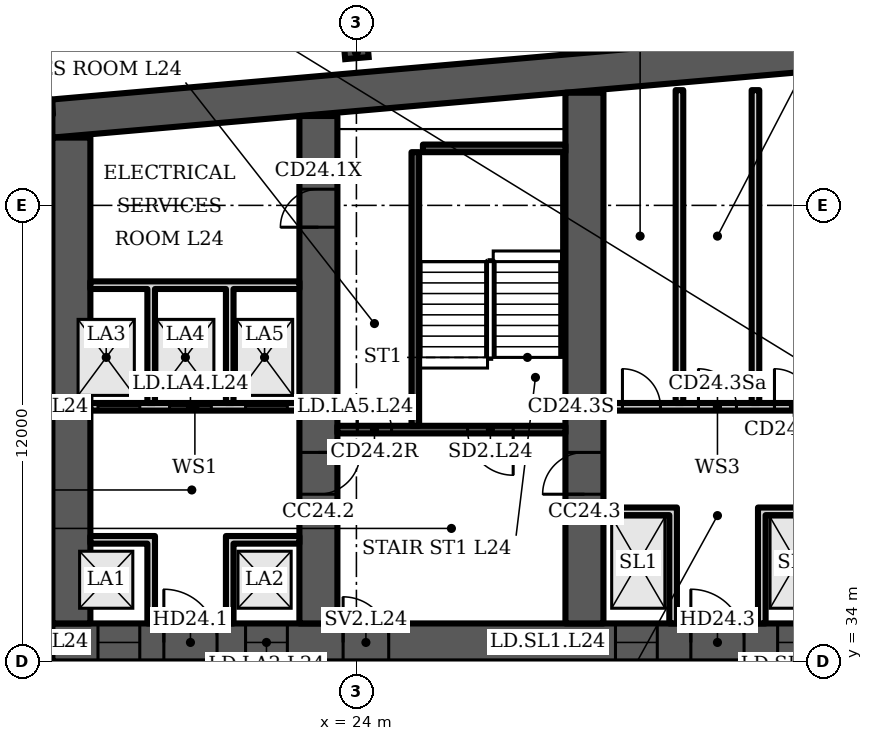
"""IFC4 building model, lengths in metres.
Left out: names, types, materials, properties, quantities, classifications, styles, units other than length and angle.
Written with IfcOpenShell. Run it as: python <this file> out.ifc"""

import sys

from ifc_helpers import new_model, si_unit, direction, frame, frame_2d, origin, origin_2d, place, context, subcontext, project, spatial, polyline, rectangle, i_section, outline, extrude, element, fill, save


model = new_model("IFC4")
c1 = context("Model", 3, precision=1e-05, world=origin(), true_north=direction((0.0, 1.0)))
c2 = subcontext(c1, "Body", "Model", "MODEL_VIEW")
j1 = project(units=[si_unit("LENGTHUNIT", "METRE"), si_unit("PLANEANGLEUNIT", "RADIAN")], contexts=[c1])
p1 = place(None, origin())
s1 = spatial("IfcSite", under=j1, at=p1, CompositionType="ELEMENT")
p2 = place(p1, origin())
s2 = spatial("IfcBuilding", under=s1, at=p2, CompositionType="ELEMENT")
p3 = place(p2, frame((0.0, 0.0, 107.5)))
s3 = spatial("IfcBuildingStorey", under=s2, at=p3, CompositionType="ELEMENT", Elevation=107.5)
p4 = place(p3, origin())
e1 = element("IfcWall", 1, at=p4, inside=s3, PredefinedType="SHEAR", context=c2, shape_type="SweptSolid", body=[
    extrude(outline(polyline([(16.0, 47.784), (40.5, 49.927), (65.0, 47.784), (65.0, 48.787), (40.5, 50.931), (16.0, 48.787), (16.0, 47.784)])), origin(), (0.0, 0.0, 1.0), 3.6),
])
p5 = place(p3, frame((16.0, 34.5, 0.0), z_axis=(0.0, 0.0, 1.0), x_axis=(1.0, 0.0, 0.0)))
e2 = element("IfcWall", 2, at=p5, inside=s3, PredefinedType="SHEAR", context=c2, shape_type="SweptSolid", body=[
    extrude(rectangle(XDim=49.0, YDim=1.0, at=frame_2d((24.5, 0.0))), origin(), (0.0, 0.0, 1.0), 3.6),
])
p6 = place(p5, frame((1.2, 0.0, 0.0)))
e3 = element("IfcOpeningElement", 3, at=p6, cuts=e2, PredefinedType="OPENING", context=c2, shape_type="SweptSolid", body=[
    extrude(rectangle(XDim=1.1, YDim=2.1, at=frame_2d((0.55, 1.05))), frame((0.0, 0.51, 0.0), z_axis=(0.0, -1.0, 0.0), x_axis=(1.0, 0.0, 0.0)), (0.0, 0.0, 1.0), 1.02),
])
p7 = place(p5, frame((5.083, 0.0, 0.0)))
e4 = element("IfcOpeningElement", 4, at=p7, cuts=e2, PredefinedType="OPENING", context=c2, shape_type="SweptSolid", body=[
    extrude(rectangle(XDim=1.1, YDim=2.1, at=frame_2d((0.55, 1.05))), frame((0.0, 0.51, 0.0), z_axis=(0.0, -1.0, 0.0), x_axis=(1.0, 0.0, 0.0)), (0.0, 0.0, 1.0), 1.02),
])
p8 = place(p5, frame((2.933, 0.0, 0.0)))
e5 = element("IfcOpeningElement", 5, at=p8, cuts=e2, PredefinedType="OPENING", context=c2, shape_type="SweptSolid", body=[
    extrude(rectangle(XDim=1.4, YDim=2.1, at=frame_2d((0.7, 1.05))), frame((0.0, 0.51, 0.0), z_axis=(0.0, -1.0, 0.0), x_axis=(1.0, 0.0, 0.0)), (0.0, 0.0, 1.0), 1.02),
])
p9 = place(p5, frame((7.65, 0.0, 0.0)))
e6 = element("IfcOpeningElement", 6, at=p9, cuts=e2, PredefinedType="OPENING", context=c2, shape_type="SweptSolid", body=[
    extrude(rectangle(XDim=1.2, YDim=2.1, at=frame_2d((0.6, 1.05))), frame((0.0, 0.51, 0.0), z_axis=(0.0, -1.0, 0.0), x_axis=(1.0, 0.0, 0.0)), (0.0, 0.0, 1.0), 1.02),
])
p10 = place(p5, frame((14.817, 0.0, 0.0)))
e7 = element("IfcOpeningElement", 7, at=p10, cuts=e2, PredefinedType="OPENING", context=c2, shape_type="SweptSolid", body=[
    extrude(rectangle(XDim=1.1, YDim=2.1, at=frame_2d((0.55, 1.05))), frame((0.0, 0.51, 0.0), z_axis=(0.0, -1.0, 0.0), x_axis=(1.0, 0.0, 0.0)), (0.0, 0.0, 1.0), 1.02),
])
p11 = place(p5, frame((19.083, 0.0, 0.0)))
e8 = element("IfcOpeningElement", 8, at=p11, cuts=e2, PredefinedType="OPENING", context=c2, shape_type="SweptSolid", body=[
    extrude(rectangle(XDim=1.1, YDim=2.1, at=frame_2d((0.55, 1.05))), frame((0.0, 0.51, 0.0), z_axis=(0.0, -1.0, 0.0), x_axis=(1.0, 0.0, 0.0)), (0.0, 0.0, 1.0), 1.02),
])
p12 = place(p5, frame((16.8, 0.0, 0.0)))
e9 = element("IfcOpeningElement", 9, at=p12, cuts=e2, PredefinedType="OPENING", context=c2, shape_type="SweptSolid", body=[
    extrude(rectangle(XDim=1.4, YDim=2.1, at=frame_2d((0.7, 1.05))), frame((0.0, 0.51, 0.0), z_axis=(0.0, -1.0, 0.0), x_axis=(1.0, 0.0, 0.0)), (0.0, 0.0, 1.0), 1.02),
])
p13 = place(p5, frame((21.817, 0.0, 0.0)))
e10 = element("IfcOpeningElement", 10, at=p13, cuts=e2, PredefinedType="OPENING", context=c2, shape_type="SweptSolid", body=[
    extrude(rectangle(XDim=1.1, YDim=2.1, at=frame_2d((0.55, 1.05))), frame((0.0, 0.51, 0.0), z_axis=(0.0, -1.0, 0.0), x_axis=(1.0, 0.0, 0.0)), (0.0, 0.0, 1.0), 1.02),
])
p14 = place(p5, frame((26.083, 0.0, 0.0)))
e11 = element("IfcOpeningElement", 11, at=p14, cuts=e2, PredefinedType="OPENING", context=c2, shape_type="SweptSolid", body=[
    extrude(rectangle(XDim=1.1, YDim=2.1, at=frame_2d((0.55, 1.05))), frame((0.0, 0.51, 0.0), z_axis=(0.0, -1.0, 0.0), x_axis=(1.0, 0.0, 0.0)), (0.0, 0.0, 1.0), 1.02),
])
p15 = place(p5, frame((33.15, 0.0, 0.0)))
e12 = element("IfcOpeningElement", 12, at=p15, cuts=e2, PredefinedType="OPENING", context=c2, shape_type="SweptSolid", body=[
    extrude(rectangle(XDim=1.2, YDim=2.1, at=frame_2d((0.6, 1.05))), frame((0.0, 0.51, 0.0), z_axis=(0.0, -1.0, 0.0), x_axis=(1.0, 0.0, 0.0)), (0.0, 0.0, 1.0), 1.02),
])
p16 = place(p5, frame((37.8, 0.0, 0.0)))
e13 = element("IfcOpeningElement", 13, at=p16, cuts=e2, PredefinedType="OPENING", context=c2, shape_type="SweptSolid", body=[
    extrude(rectangle(XDim=1.4, YDim=2.1, at=frame_2d((0.7, 1.05))), frame((0.0, 0.51, 0.0), z_axis=(0.0, -1.0, 0.0), x_axis=(1.0, 0.0, 0.0)), (0.0, 0.0, 1.0), 1.02),
])
p17 = place(p5, frame((42.817, 0.0, 0.0)))
e14 = element("IfcOpeningElement", 14, at=p17, cuts=e2, PredefinedType="OPENING", context=c2, shape_type="SweptSolid", body=[
    extrude(rectangle(XDim=1.1, YDim=2.1, at=frame_2d((0.55, 1.05))), frame((0.0, 0.51, 0.0), z_axis=(0.0, -1.0, 0.0), x_axis=(1.0, 0.0, 0.0)), (0.0, 0.0, 1.0), 1.02),
])
p18 = place(p5, frame((46.7, 0.0, 0.0)))
e15 = element("IfcOpeningElement", 15, at=p18, cuts=e2, PredefinedType="OPENING", context=c2, shape_type="SweptSolid", body=[
    extrude(rectangle(XDim=1.1, YDim=2.1, at=frame_2d((0.55, 1.05))), frame((0.0, 0.51, 0.0), z_axis=(0.0, -1.0, 0.0), x_axis=(1.0, 0.0, 0.0)), (0.0, 0.0, 1.0), 1.02),
])
p19 = place(p5, frame((44.667, 0.0, 0.0)))
e16 = element("IfcOpeningElement", 16, at=p19, cuts=e2, PredefinedType="OPENING", context=c2, shape_type="SweptSolid", body=[
    extrude(rectangle(XDim=1.4, YDim=2.1, at=frame_2d((0.7, 1.05))), frame((0.0, 0.51, 0.0), z_axis=(0.0, -1.0, 0.0), x_axis=(1.0, 0.0, 0.0)), (0.0, 0.0, 1.0), 1.02),
])
p20 = place(p3, frame((16.5, 35.0, 0.0), z_axis=(0.0, 0.0, 1.0), x_axis=(0.0, 1.0, 0.0)))
e17 = element("IfcWall", 17, at=p20, inside=s3, PredefinedType="SHEAR", context=c2, shape_type="SweptSolid", body=[
    extrude(rectangle(XDim=12.784, YDim=1.0, at=frame_2d((6.392, 0.0))), origin(), (0.0, 0.0, 1.0), 3.6),
])
p21 = place(p3, frame((23.0, 35.0, 0.0), z_axis=(0.0, 0.0, 1.0), x_axis=(0.0, 1.0, 0.0)))
e18 = element("IfcWall", 18, at=p21, inside=s3, PredefinedType="SHEAR", context=c2, shape_type="SweptSolid", body=[
    extrude(rectangle(XDim=13.352, YDim=1.0, at=frame_2d((6.676, 0.0))), origin(), (0.0, 0.0, 1.0), 3.6),
])
p22 = place(p21, frame((10.426, 0.0, 0.0)))
e19 = element("IfcOpeningElement", 19, at=p22, cuts=e18, PredefinedType="OPENING", context=c2, shape_type="SweptSolid", body=[
    extrude(rectangle(XDim=1.0, YDim=2.1, at=frame_2d((0.5, 1.05))), frame((0.0, 0.51, 0.0), z_axis=(0.0, -1.0, 0.0), x_axis=(1.0, 0.0, 0.0)), (0.0, 0.0, 1.0), 1.02),
])
p23 = place(p21, frame((3.4, 0.0, 0.0)))
e20 = element("IfcOpeningElement", 20, at=p23, cuts=e18, PredefinedType="OPENING", context=c2, shape_type="SweptSolid", body=[
    extrude(rectangle(XDim=1.1, YDim=2.1, at=frame_2d((0.55, 1.05))), frame((0.0, 0.51, 0.0), z_axis=(0.0, -1.0, 0.0), x_axis=(1.0, 0.0, 0.0)), (0.0, 0.0, 1.0), 1.02),
])
p24 = place(p3, frame((30.0, 35.0, 0.0), z_axis=(0.0, 0.0, 1.0), x_axis=(0.0, 1.0, 0.0)))
e21 = element("IfcWall", 21, at=p24, inside=s3, PredefinedType="SHEAR", context=c2, shape_type="SweptSolid", body=[
    extrude(rectangle(XDim=13.965, YDim=1.0, at=frame_2d((6.982, 0.0))), origin(), (0.0, 0.0, 1.0), 3.6),
])
p25 = place(p24, frame((3.4, 0.0, 0.0)))
e22 = element("IfcOpeningElement", 22, at=p25, cuts=e21, PredefinedType="OPENING", context=c2, shape_type="SweptSolid", body=[
    extrude(rectangle(XDim=1.1, YDim=2.1, at=frame_2d((0.55, 1.05))), frame((0.0, 0.51, 0.0), z_axis=(0.0, -1.0, 0.0), x_axis=(1.0, 0.0, 0.0)), (0.0, 0.0, 1.0), 1.02),
])
p26 = place(p3, frame((24.0, 50.027, 0.0), z_axis=(0.0, 0.0, 1.0), x_axis=(-0.087156, 0.996198, 0.0)))
e23 = element("IfcColumn", 23, at=p26, inside=s3, PredefinedType="COLUMN", context=c2, shape_type="SweptSolid", body=[
    extrude(i_section(OverallWidth=0.305, OverallDepth=0.62, WebThickness=0.021, FlangeThickness=0.04, FilletRadius=0.027, at=origin_2d()), origin(), (0.0, 0.0, 1.0), 3.6),
])
p27 = place(p3, frame((16.0, 48.587, 0.0), z_axis=(0.0, 0.0, 1.0), x_axis=(-0.996194, -0.087168, 0.0)))
e24 = element("IfcWall", 24, at=p27, inside=s3, PredefinedType="SOLIDWALL", context=c2, shape_type="SweptSolid", body=[
    extrude(rectangle(XDim=2.994, YDim=0.4, at=frame_2d((1.497, 0.0))), origin(), (0.0, 0.0, 1.0), 3.2),
])
p28 = place(p3, frame((17.0, 40.7, 0.0), z_axis=(0.0, 0.0, 1.0), x_axis=(1.0, 0.0, 0.0)))
e25 = element("IfcWall", 25, at=p28, inside=s3, PredefinedType="PARTITIONING", context=c2, shape_type="SweptSolid", body=[
    extrude(rectangle(XDim=5.5, YDim=0.2, at=frame_2d((2.75, 0.0))), origin(), (0.0, 0.0, 1.0), 3.2),
])
p29 = place(p28, frame((0.2, 0.0, 0.0)))
e26 = element("IfcOpeningElement", 26, at=p29, cuts=e25, PredefinedType="OPENING", context=c2, shape_type="SweptSolid", body=[
    extrude(rectangle(XDim=1.1, YDim=2.1, at=frame_2d((0.55, 1.05))), frame((0.0, 0.11, 0.0), z_axis=(0.0, -1.0, 0.0), x_axis=(1.0, 0.0, 0.0)), (0.0, 0.0, 1.0), 0.22),
])
p30 = place(p28, frame((2.083, 0.0, 0.0)))
e27 = element("IfcOpeningElement", 27, at=p30, cuts=e25, PredefinedType="OPENING", context=c2, shape_type="SweptSolid", body=[
    extrude(rectangle(XDim=1.1, YDim=2.1, at=frame_2d((0.55, 1.05))), frame((0.0, 0.11, 0.0), z_axis=(0.0, -1.0, 0.0), x_axis=(1.0, 0.0, 0.0)), (0.0, 0.0, 1.0), 0.22),
])
p31 = place(p28, frame((4.083, 0.0, 0.0)))
e28 = element("IfcOpeningElement", 28, at=p31, cuts=e25, PredefinedType="OPENING", context=c2, shape_type="SweptSolid", body=[
    extrude(rectangle(XDim=1.1, YDim=2.1, at=frame_2d((0.55, 1.05))), frame((0.0, 0.11, 0.0), z_axis=(0.0, -1.0, 0.0), x_axis=(1.0, 0.0, 0.0)), (0.0, 0.0, 1.0), 0.22),
])
p32 = place(p3, frame((0.0, 0.0, -0.0)))
e29 = element("IfcWall", 29, at=p32, inside=s3, PredefinedType="PARTITIONING", context=c2, shape_type="SweptSolid", body=[
    extrude(outline(polyline([(18.5, 37.1), (17.0, 37.1), (17.0, 37.3), (18.5, 37.3), (18.7, 37.3), (18.7, 35.0), (18.5, 35.0), (18.5, 37.1)])), origin(), (0.0, 0.0, 1.0), 3.2),
])
p33 = place(p3, frame((0.0, 0.0, -0.0)))
e30 = element("IfcWall", 30, at=p33, inside=s3, PredefinedType="PARTITIONING", context=c2, shape_type="SweptSolid", body=[
    extrude(outline(polyline([(20.567, 37.3), (20.767, 37.3), (22.5, 37.3), (22.5, 37.1), (20.767, 37.1), (20.767, 35.0), (20.567, 35.0), (20.567, 37.3)])), origin(), (0.0, 0.0, 1.0), 3.2),
])
p34 = place(p3, frame((0.0, 0.0, -0.0)))
e31 = element("IfcWall", 31, at=p34, inside=s3, PredefinedType="PARTITIONING", context=c2, shape_type="SweptSolid", body=[
    extrude(outline(polyline([(18.7, 40.8), (18.5, 40.8), (18.5, 43.8), (17.0, 43.8), (17.0, 44.0), (22.5, 44.0), (22.5, 43.8), (20.767, 43.8), (20.767, 40.8), (20.567, 40.8), (20.567, 43.8), (18.7, 43.8), (18.7, 40.8)])), origin(), (0.0, 0.0, 1.0), 3.2),
])
p35 = place(p3, frame((23.5, 40.1, 0.0), z_axis=(0.0, 0.0, 1.0), x_axis=(1.0, 0.0, 0.0)))
e32 = element("IfcWall", 32, at=p35, inside=s3, PredefinedType="SHEAR", context=c2, shape_type="SweptSolid", body=[
    extrude(rectangle(XDim=6.0, YDim=0.2, at=frame_2d((3.0, 0.0))), origin(), (0.0, 0.0, 1.0), 3.2),
])
p36 = place(p35, frame((3.425, 0.0, 0.0)))
e33 = element("IfcOpeningElement", 33, at=p36, cuts=e32, PredefinedType="OPENING", context=c2, shape_type="SweptSolid", body=[
    extrude(rectangle(XDim=1.2, YDim=2.1, at=frame_2d((0.6, 1.05))), frame((0.0, 0.11, 0.0), z_axis=(0.0, -1.0, 0.0), x_axis=(1.0, 0.0, 0.0)), (0.0, 0.0, 1.0), 0.22),
])
p37 = place(p35, frame((0.525, 0.0, 0.0)))
e34 = element("IfcOpeningElement", 34, at=p37, cuts=e32, PredefinedType="OPENING", context=c2, shape_type="SweptSolid", body=[
    extrude(rectangle(XDim=0.9, YDim=2.1, at=frame_2d((0.45, 1.05))), frame((0.0, 0.11, 0.0), z_axis=(0.0, -1.0, 0.0), x_axis=(1.0, 0.0, 0.0)), (0.0, 0.0, 1.0), 0.22),
])
p38 = place(p3, frame((25.55, 40.2, 0.0), z_axis=(0.0, 0.0, 1.0), x_axis=(0.0, 1.0, 0.0)))
e35 = element("IfcWall", 35, at=p38, inside=s3, PredefinedType="SHEAR", context=c2, shape_type="SweptSolid", body=[
    extrude(rectangle(XDim=7.2, YDim=0.2, at=frame_2d((3.6, 0.0))), origin(), (0.0, 0.0, 1.0), 3.2),
])
p39 = place(p3, frame((25.75, 47.5, 0.0), z_axis=(0.0, 0.0, 1.0), x_axis=(1.0, 0.0, 0.0)))
e36 = element("IfcWall", 36, at=p39, inside=s3, PredefinedType="SHEAR", context=c2, shape_type="SweptSolid", body=[
    extrude(rectangle(XDim=3.75, YDim=0.2, at=frame_2d((1.875, 0.0))), origin(), (0.0, 0.0, 1.0), 3.2),
])
p40 = place(p3, frame((30.5, 40.7, 0.0), z_axis=(0.0, 0.0, 1.0), x_axis=(1.0, 0.0, 0.0)))
e37 = element("IfcWall", 37, at=p40, inside=s3, PredefinedType="PARTITIONING", context=c2, shape_type="SweptSolid", body=[
    extrude(rectangle(XDim=6.0, YDim=0.2, at=frame_2d((3.0, 0.0))), origin(), (0.0, 0.0, 1.0), 3.2),
])
p41 = place(p40, frame((0.5, 0.0, 0.0)))
e38 = element("IfcOpeningElement", 38, at=p41, cuts=e37, PredefinedType="OPENING", context=c2, shape_type="SweptSolid", body=[
    extrude(rectangle(XDim=1.0, YDim=2.1, at=frame_2d((0.5, 1.05))), frame((0.0, 0.11, 0.0), z_axis=(0.0, -1.0, 0.0), x_axis=(1.0, 0.0, 0.0)), (0.0, 0.0, 1.0), 0.22),
])
p42 = place(p40, frame((2.5, 0.0, 0.0)))
e39 = element("IfcOpeningElement", 39, at=p42, cuts=e37, PredefinedType="OPENING", context=c2, shape_type="SweptSolid", body=[
    extrude(rectangle(XDim=1.0, YDim=2.1, at=frame_2d((0.5, 1.05))), frame((0.0, 0.11, 0.0), z_axis=(0.0, -1.0, 0.0), x_axis=(1.0, 0.0, 0.0)), (0.0, 0.0, 1.0), 0.22),
])
p43 = place(p40, frame((4.5, 0.0, 0.0)))
e40 = element("IfcOpeningElement", 40, at=p43, cuts=e37, PredefinedType="OPENING", context=c2, shape_type="SweptSolid", body=[
    extrude(rectangle(XDim=1.0, YDim=2.1, at=frame_2d((0.5, 1.05))), frame((0.0, 0.11, 0.0), z_axis=(0.0, -1.0, 0.0), x_axis=(1.0, 0.0, 0.0)), (0.0, 0.0, 1.0), 0.22),
])
p44 = place(p3, frame((0.0, 0.0, -0.0)))
e41 = element("IfcWall", 41, at=p44, inside=s3, PredefinedType="PARTITIONING", context=c2, shape_type="SweptSolid", body=[
    extrude(outline(polyline([(32.233, 37.85), (30.5, 37.85), (30.5, 38.05), (32.233, 38.05), (32.433, 38.05), (32.433, 35.0), (32.233, 35.0), (32.233, 37.85)])), origin(), (0.0, 0.0, 1.0), 3.2),
])
p45 = place(p3, frame((0.0, 0.0, -0.0)))
e42 = element("IfcWall", 42, at=p45, inside=s3, PredefinedType="PARTITIONING", context=c2, shape_type="SweptSolid", body=[
    extrude(outline(polyline([(34.567, 38.05), (34.767, 38.05), (36.5, 38.05), (36.5, 37.85), (34.767, 37.85), (34.767, 35.0), (34.567, 35.0), (34.567, 38.05)])), origin(), (0.0, 0.0, 1.0), 3.2),
])
for number, where, z_axis, x_axis in (
    (43, (32.5, 40.8, 0.0), (0.0, 0.0, 1.0), (0.0, 1.0, 0.0)),
    (44, (34.5, 40.8, 0.0), (0.0, 0.0, 1.0), (0.0, 1.0, 0.0)),
):
    element("IfcWall", number, at=place(p3, frame(where, z_axis=z_axis, x_axis=x_axis)), inside=s3, PredefinedType="PARTITIONING", context=c2, shape_type="SweptSolid", body=[
        extrude(rectangle(XDim=8.232, YDim=0.2, at=frame_2d((4.116, 0.0))), origin(), (0.0, 0.0, 1.0), 3.2),
    ])
p46 = place(p6, origin())
e45 = element("IfcDoor", 45, at=p46, inside=s3, OperationType="DOUBLE_DOOR_SLIDING", PredefinedType="DOOR", context=c2, shape_type="SweptSolid", body=[
    extrude(rectangle(XDim=1.1, YDim=2.1, at=frame_2d((0.55, 1.05))), frame((0.0, 0.025, 0.0), z_axis=(0.0, -1.0, 0.0), x_axis=(1.0, 0.0, 0.0)), (0.0, 0.0, 1.0), 0.05),
])
fill(e3, e45)
p47 = place(p7, origin())
e46 = element("IfcDoor", 46, at=p47, inside=s3, OperationType="DOUBLE_DOOR_SLIDING", PredefinedType="DOOR", context=c2, shape_type="SweptSolid", body=[
    extrude(rectangle(XDim=1.1, YDim=2.1, at=frame_2d((0.55, 1.05))), frame((0.0, 0.025, 0.0), z_axis=(0.0, -1.0, 0.0), x_axis=(1.0, 0.0, 0.0)), (0.0, 0.0, 1.0), 0.05),
])
fill(e4, e46)
p48 = place(p8, origin())
e47 = element("IfcDoor", 47, at=p48, inside=s3, OperationType="DOUBLE_DOOR_SINGLE_SWING", PredefinedType="DOOR", context=c2, shape_type="SweptSolid", body=[
    extrude(rectangle(XDim=1.4, YDim=2.1, at=frame_2d((0.7, 1.05))), frame((0.0, 0.025, 0.0), z_axis=(0.0, -1.0, 0.0), x_axis=(1.0, 0.0, 0.0)), (0.0, 0.0, 1.0), 0.05),
])
fill(e5, e47)
p49 = place(p29, origin())
e48 = element("IfcDoor", 48, at=p49, inside=s3, OperationType="DOUBLE_DOOR_SLIDING", PredefinedType="DOOR", context=c2, shape_type="SweptSolid", body=[
    extrude(rectangle(XDim=1.1, YDim=2.1, at=frame_2d((0.55, 1.05))), frame((0.0, 0.025, 0.0), z_axis=(0.0, -1.0, 0.0), x_axis=(1.0, 0.0, 0.0)), (0.0, 0.0, 1.0), 0.05),
])
fill(e26, e48)
p50 = place(p30, origin())
e49 = element("IfcDoor", 49, at=p50, inside=s3, OperationType="DOUBLE_DOOR_SLIDING", PredefinedType="DOOR", context=c2, shape_type="SweptSolid", body=[
    extrude(rectangle(XDim=1.1, YDim=2.1, at=frame_2d((0.55, 1.05))), frame((0.0, 0.025, 0.0), z_axis=(0.0, -1.0, 0.0), x_axis=(1.0, 0.0, 0.0)), (0.0, 0.0, 1.0), 0.05),
])
fill(e27, e49)
p51 = place(p31, origin())
e50 = element("IfcDoor", 50, at=p51, inside=s3, OperationType="DOUBLE_DOOR_SLIDING", PredefinedType="DOOR", context=c2, shape_type="SweptSolid", body=[
    extrude(rectangle(XDim=1.1, YDim=2.1, at=frame_2d((0.55, 1.05))), frame((0.0, 0.025, 0.0), z_axis=(0.0, -1.0, 0.0), x_axis=(1.0, 0.0, 0.0)), (0.0, 0.0, 1.0), 0.05),
])
fill(e28, e50)
p52 = place(p22, origin())
e51 = element("IfcDoor", 51, at=p52, inside=s3, OperationType="SINGLE_SWING_LEFT", PredefinedType="DOOR", context=c2, shape_type="SweptSolid", body=[
    extrude(rectangle(XDim=1.0, YDim=2.1, at=frame_2d((0.5, 1.05))), frame((0.0, 0.5, 0.0), z_axis=(0.0, -1.0, 0.0), x_axis=(1.0, 0.0, 0.0)), (0.0, 0.0, 1.0), 1.0),
])
fill(e19, e51)
p53 = place(p36, origin())
e52 = element("IfcDoor", 52, at=p53, inside=s3, OperationType="SINGLE_SWING_RIGHT", PredefinedType="DOOR", context=c2, shape_type="SweptSolid", body=[
    extrude(rectangle(XDim=1.2, YDim=2.1, at=frame_2d((0.6, 1.05))), frame((0.0, 0.025, 0.0), z_axis=(0.0, -1.0, 0.0), x_axis=(1.0, 0.0, 0.0)), (0.0, 0.0, 1.0), 0.05),
])
fill(e33, e52)
p54 = place(p37, origin())
e53 = element("IfcDoor", 53, at=p54, inside=s3, OperationType="SINGLE_SWING_LEFT", PredefinedType="DOOR", context=c2, shape_type="SweptSolid", body=[
    extrude(rectangle(XDim=0.9, YDim=2.1, at=frame_2d((0.45, 1.05))), frame((0.0, 0.025, 0.0), z_axis=(0.0, -1.0, 0.0), x_axis=(1.0, 0.0, 0.0)), (0.0, 0.0, 1.0), 0.05),
])
fill(e34, e53)
p55 = place(p9, origin())
e54 = element("IfcDoor", 54, at=p55, inside=s3, OperationType="SINGLE_SWING_LEFT", PredefinedType="DOOR", context=c2, shape_type="SweptSolid", body=[
    extrude(rectangle(XDim=1.2, YDim=2.1, at=frame_2d((0.6, 1.05))), frame((0.0, 0.025, 0.0), z_axis=(0.0, -1.0, 0.0), x_axis=(1.0, 0.0, 0.0)), (0.0, 0.0, 1.0), 0.05),
])
fill(e6, e54)
p56 = place(p10, origin())
e55 = element("IfcDoor", 55, at=p56, inside=s3, OperationType="DOUBLE_DOOR_SLIDING", PredefinedType="DOOR", context=c2, shape_type="SweptSolid", body=[
    extrude(rectangle(XDim=1.1, YDim=2.1, at=frame_2d((0.55, 1.05))), frame((0.0, 0.025, 0.0), z_axis=(0.0, -1.0, 0.0), x_axis=(1.0, 0.0, 0.0)), (0.0, 0.0, 1.0), 0.05),
])
fill(e7, e55)
p57 = place(p11, origin())
e56 = element("IfcDoor", 56, at=p57, inside=s3, OperationType="DOUBLE_DOOR_SLIDING", PredefinedType="DOOR", context=c2, shape_type="SweptSolid", body=[
    extrude(rectangle(XDim=1.1, YDim=2.1, at=frame_2d((0.55, 1.05))), frame((0.0, 0.025, 0.0), z_axis=(0.0, -1.0, 0.0), x_axis=(1.0, 0.0, 0.0)), (0.0, 0.0, 1.0), 0.05),
])
fill(e8, e56)
p58 = place(p12, origin())
e57 = element("IfcDoor", 57, at=p58, inside=s3, OperationType="DOUBLE_DOOR_SINGLE_SWING", PredefinedType="DOOR", context=c2, shape_type="SweptSolid", body=[
    extrude(rectangle(XDim=1.4, YDim=2.1, at=frame_2d((0.7, 1.05))), frame((0.0, 0.025, 0.0), z_axis=(0.0, -1.0, 0.0), x_axis=(1.0, 0.0, 0.0)), (0.0, 0.0, 1.0), 0.05),
])
fill(e9, e57)
p59 = place(p41, origin())
e58 = element("IfcDoor", 58, at=p59, inside=s3, OperationType="SINGLE_SWING_LEFT", PredefinedType="DOOR", context=c2, shape_type="SweptSolid", body=[
    extrude(rectangle(XDim=1.0, YDim=2.1, at=frame_2d((0.5, 1.05))), frame((0.0, 0.025, 0.0), z_axis=(0.0, -1.0, 0.0), x_axis=(1.0, 0.0, 0.0)), (0.0, 0.0, 1.0), 0.05),
])
fill(e38, e58)
p60 = place(p42, origin())
e59 = element("IfcDoor", 59, at=p60, inside=s3, OperationType="SINGLE_SWING_LEFT", PredefinedType="DOOR", context=c2, shape_type="SweptSolid", body=[
    extrude(rectangle(XDim=1.0, YDim=2.1, at=frame_2d((0.5, 1.05))), frame((0.0, 0.025, 0.0), z_axis=(0.0, -1.0, 0.0), x_axis=(1.0, 0.0, 0.0)), (0.0, 0.0, 1.0), 0.05),
])
fill(e39, e59)
p61 = place(p43, origin())
e60 = element("IfcDoor", 60, at=p61, inside=s3, OperationType="SINGLE_SWING_LEFT", PredefinedType="DOOR", context=c2, shape_type="SweptSolid", body=[
    extrude(rectangle(XDim=1.0, YDim=2.1, at=frame_2d((0.5, 1.05))), frame((0.0, 0.025, 0.0), z_axis=(0.0, -1.0, 0.0), x_axis=(1.0, 0.0, 0.0)), (0.0, 0.0, 1.0), 0.05),
])
fill(e40, e60)
p62 = place(p23, origin())
e61 = element("IfcDoor", 61, at=p62, inside=s3, OperationType="SINGLE_SWING_RIGHT", PredefinedType="DOOR", context=c2, shape_type="SweptSolid", body=[
    extrude(rectangle(XDim=1.1, YDim=2.1, at=frame_2d((0.55, 1.05))), frame((0.0, 0.025, 0.0), z_axis=(0.0, -1.0, 0.0), x_axis=(1.0, 0.0, 0.0)), (0.0, 0.0, 1.0), 0.05),
])
fill(e20, e61)
p63 = place(p25, origin())
e62 = element("IfcDoor", 62, at=p63, inside=s3, OperationType="SINGLE_SWING_LEFT", PredefinedType="DOOR", context=c2, shape_type="SweptSolid", body=[
    extrude(rectangle(XDim=1.1, YDim=2.1, at=frame_2d((0.55, 1.05))), frame((0.0, 0.025, 0.0), z_axis=(0.0, -1.0, 0.0), x_axis=(1.0, 0.0, 0.0)), (0.0, 0.0, 1.0), 0.05),
])
fill(e22, e62)
save(model, sys.argv[1])
